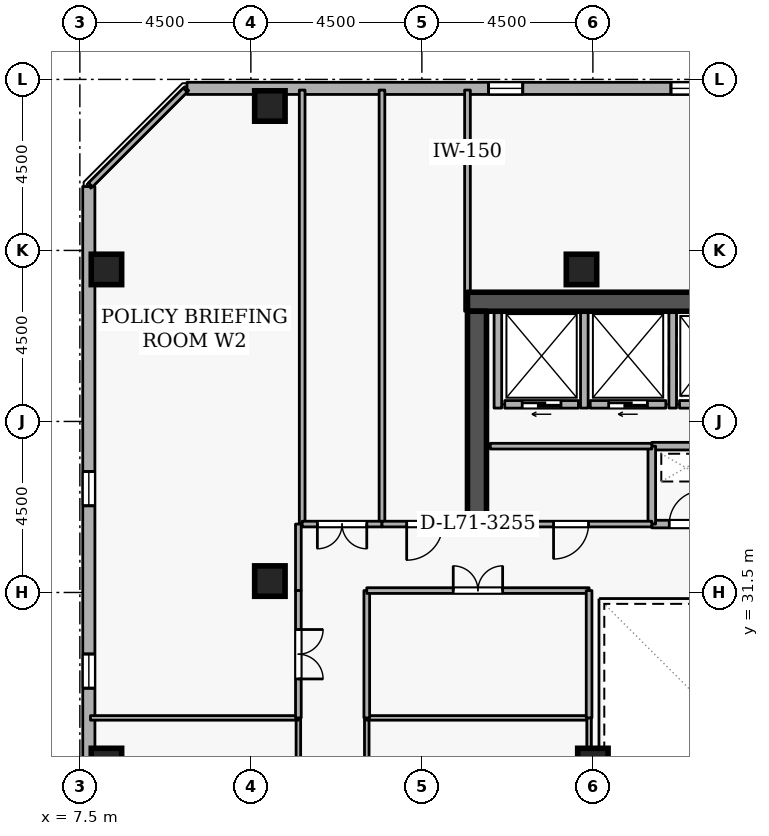
"""IFC4 building model, lengths in metres.
Left out: names, types, materials, properties, quantities, classifications, styles, units other than length and angle.
Written with IfcOpenShell. Run it as: python <this file> out.ifc"""

import sys

from ifc_helpers import new_model, si_unit, direction, frame, frame_2d, origin, origin_2d, place, context, subcontext, project, spatial, rectangle, extrude, element, fill, save


model = new_model("IFC4")
c1 = context("Model", 3, precision=1e-05, world=origin(), true_north=direction((0.0, 1.0)))
c2 = subcontext(c1, "Body", "Model", "MODEL_VIEW")
j1 = project(units=[si_unit("LENGTHUNIT", "METRE"), si_unit("PLANEANGLEUNIT", "RADIAN")], contexts=[c1])
p1 = place(None, origin())
s1 = spatial("IfcSite", under=j1, at=p1, CompositionType="ELEMENT")
p2 = place(p1, origin())
s2 = spatial("IfcBuilding", under=s1, at=p2, CompositionType="ELEMENT")
p3 = place(p2, frame((0.0, 0.0, 265.5)))
s3 = spatial("IfcBuildingStorey", under=s2, at=p3, CompositionType="ELEMENT", Elevation=265.5)
p4 = place(p3, frame((17.7, 39.15, 0.0), z_axis=(0.0, 0.0, 1.0), x_axis=(1.0, 0.0, 0.0)))
e1 = element("IfcWall", 1, at=p4, inside=s3, PredefinedType="SHEAR", context=c2, shape_type="SweptSolid", body=[
    extrude(rectangle(XDim=15.6, YDim=0.5, at=frame_2d((7.8, 0.0))), origin(), (0.0, 0.0, 1.0), 3.6),
])
p5 = place(p3, frame((17.95, 33.1, 0.0), z_axis=(0.0, 0.0, 1.0), x_axis=(0.0, 1.0, 0.0)))
e2 = element("IfcWall", 2, at=p5, inside=s3, PredefinedType="SHEAR", context=c2, shape_type="SweptSolid", body=[
    extrude(rectangle(XDim=5.8, YDim=0.5, at=frame_2d((2.9, 0.0))), origin(), (0.0, 0.0, 1.0), 3.6),
])
for number, where, z_axis, x_axis in (
    (3, (12.5, 44.3, 0.0), (0.0, 0.0, 1.0), (1.0, 0.0, 0.0)),
    (4, (8.2, 27.0, 0.0), (0.0, 0.0, 1.0), (1.0, 0.0, 0.0)),
    (5, (8.2, 40.0, 0.0), (0.0, 0.0, 1.0), (1.0, 0.0, 0.0)),
    (6, (12.5, 31.8, 0.0), (0.0, 0.0, 1.0), (1.0, 0.0, 0.0)),
    (7, (20.7, 40.0, 0.0), (0.0, 0.0, 1.0), (1.0, 0.0, 0.0)),
    (8, (21.0, 27.0, 0.0), (0.0, 0.0, 1.0), (1.0, 0.0, 0.0)),
):
    element("IfcColumn", number, at=place(p3, frame(where, z_axis=z_axis, x_axis=x_axis)), inside=s3, PredefinedType="COLUMN", context=c2, shape_type="SweptSolid", body=[
        extrude(rectangle(XDim=0.8, YDim=0.8, at=origin_2d()), origin(), (0.0, 0.0, 1.0), 3.6),
    ])
p6 = place(p3, frame((45.854, 44.762, 0.0), z_axis=(0.0, 0.0, 1.0), x_axis=(-0.999999997144, 7.5574884e-05, 0.0)))
e9 = element("IfcWall", 9, at=p6, inside=s3, PredefinedType="STANDARD", context=c2, shape_type="SweptSolid", body=[
    extrude(rectangle(XDim=35.535, YDim=0.32, at=frame_2d((17.768, 0.0))), origin(), (0.0, 0.0, 1.0), 2.7),
])
p7 = place(p6, frame((2.7, 0.0, 0.72)))
e10 = element("IfcOpeningElement", 10, at=p7, cuts=e9, PredefinedType="OPENING", context=c2, shape_type="SweptSolid", body=[
    extrude(rectangle(XDim=0.9, YDim=1.75, at=frame_2d((0.45, 0.875))), frame((0.0, 0.17, 0.0), z_axis=(0.0, -1.0, 0.0), x_axis=(1.0, 0.0, 0.0)), (0.0, 0.0, 1.0), 0.34),
])
p8 = place(p6, frame((12.3, 0.0, 0.72)))
e11 = element("IfcOpeningElement", 11, at=p8, cuts=e9, PredefinedType="OPENING", context=c2, shape_type="SweptSolid", body=[
    extrude(rectangle(XDim=0.9, YDim=1.75, at=frame_2d((0.45, 0.875))), frame((0.0, 0.17, 0.0), z_axis=(0.0, -1.0, 0.0), x_axis=(1.0, 0.0, 0.0)), (0.0, 0.0, 1.0), 0.34),
])
p9 = place(p6, frame((17.1, 0.0, 0.72)))
e12 = element("IfcOpeningElement", 12, at=p9, cuts=e9, PredefinedType="OPENING", context=c2, shape_type="SweptSolid", body=[
    extrude(rectangle(XDim=0.9, YDim=1.75, at=frame_2d((0.45, 0.875))), frame((0.0, 0.17, 0.0), z_axis=(0.0, -1.0, 0.0), x_axis=(1.0, 0.0, 0.0)), (0.0, 0.0, 1.0), 0.34),
])
p10 = place(p6, frame((21.9, 0.0, 0.72)))
e13 = element("IfcOpeningElement", 13, at=p10, cuts=e9, PredefinedType="OPENING", context=c2, shape_type="SweptSolid", body=[
    extrude(rectangle(XDim=0.9, YDim=1.75, at=frame_2d((0.45, 0.875))), frame((0.0, 0.17, 0.0), z_axis=(0.0, -1.0, 0.0), x_axis=(1.0, 0.0, 0.0)), (0.0, 0.0, 1.0), 0.34),
])
p11 = place(p6, frame((26.7, 0.0, 0.72)))
e14 = element("IfcOpeningElement", 14, at=p11, cuts=e9, PredefinedType="OPENING", context=c2, shape_type="SweptSolid", body=[
    extrude(rectangle(XDim=0.9, YDim=1.75, at=frame_2d((0.45, 0.875))), frame((0.0, 0.17, 0.0), z_axis=(0.0, -1.0, 0.0), x_axis=(1.0, 0.0, 0.0)), (0.0, 0.0, 1.0), 0.34),
])
p12 = place(p3, frame((7.735, 42.181, 0.0), z_axis=(0.0, 0.0, 1.0), x_axis=(7.5574884e-05, -0.999999997144, 0.0)))
e15 = element("IfcWall", 15, at=p12, inside=s3, PredefinedType="STANDARD", context=c2, shape_type="SweptSolid", body=[
    extrude(rectangle(XDim=35.535, YDim=0.32, at=frame_2d((17.768, 0.0))), origin(), (0.0, 0.0, 1.0), 2.7),
])
p13 = place(p12, frame((7.5, 0.0, 0.72)))
e16 = element("IfcOpeningElement", 16, at=p13, cuts=e15, PredefinedType="OPENING", context=c2, shape_type="SweptSolid", body=[
    extrude(rectangle(XDim=0.9, YDim=1.75, at=frame_2d((0.45, 0.875))), frame((0.0, 0.17, 0.0), z_axis=(0.0, -1.0, 0.0), x_axis=(1.0, 0.0, 0.0)), (0.0, 0.0, 1.0), 0.34),
])
p14 = place(p12, frame((12.3, 0.0, 0.72)))
e17 = element("IfcOpeningElement", 17, at=p14, cuts=e15, PredefinedType="OPENING", context=c2, shape_type="SweptSolid", body=[
    extrude(rectangle(XDim=0.9, YDim=1.75, at=frame_2d((0.45, 0.875))), frame((0.0, 0.17, 0.0), z_axis=(0.0, -1.0, 0.0), x_axis=(1.0, 0.0, 0.0)), (0.0, 0.0, 1.0), 0.34),
])
p15 = place(p12, frame((17.1, 0.0, 0.72)))
e18 = element("IfcOpeningElement", 18, at=p15, cuts=e15, PredefinedType="OPENING", context=c2, shape_type="SweptSolid", body=[
    extrude(rectangle(XDim=0.9, YDim=1.75, at=frame_2d((0.45, 0.875))), frame((0.0, 0.17, 0.0), z_axis=(0.0, -1.0, 0.0), x_axis=(1.0, 0.0, 0.0)), (0.0, 0.0, 1.0), 0.34),
])
p16 = place(p12, frame((21.9, 0.0, 0.72)))
e19 = element("IfcOpeningElement", 19, at=p16, cuts=e15, PredefinedType="OPENING", context=c2, shape_type="SweptSolid", body=[
    extrude(rectangle(XDim=0.9, YDim=1.75, at=frame_2d((0.45, 0.875))), frame((0.0, 0.17, 0.0), z_axis=(0.0, -1.0, 0.0), x_axis=(1.0, 0.0, 0.0)), (0.0, 0.0, 1.0), 0.34),
])
p17 = place(p12, frame((31.5, 0.0, 0.72)))
e20 = element("IfcOpeningElement", 20, at=p17, cuts=e15, PredefinedType="OPENING", context=c2, shape_type="SweptSolid", body=[
    extrude(rectangle(XDim=0.9, YDim=1.75, at=frame_2d((0.45, 0.875))), frame((0.0, 0.17, 0.0), z_axis=(0.0, -1.0, 0.0), x_axis=(1.0, 0.0, 0.0)), (0.0, 0.0, 1.0), 0.34),
])
p18 = place(p3, frame((24.92, 36.45, 0.0), z_axis=(0.0, 0.0, 1.0), x_axis=(-1.0, 0.0, 0.0)))
e21 = element("IfcWall", 21, at=p18, inside=s3, PredefinedType="STANDARD", context=c2, shape_type="SweptSolid", body=[
    extrude(rectangle(XDim=1.64, YDim=0.2, at=frame_2d((0.82, 0.0))), origin(), (0.0, 0.0, 1.0), 3.34),
])
p19 = place(p18, frame((0.31, 0.0, 0.0)))
e22 = element("IfcOpeningElement", 22, at=p19, cuts=e21, PredefinedType="OPENING", context=c2, shape_type="SweptSolid", body=[
    extrude(rectangle(XDim=1.02, YDim=2.06, at=frame_2d((0.51, 1.03))), frame((0.0, 0.11, 0.0), z_axis=(0.0, -1.0, 0.0), x_axis=(1.0, 0.0, 0.0)), (0.0, 0.0, 1.0), 0.22),
])
p20 = place(p3, frame((22.92, 36.45, 0.0), z_axis=(0.0, 0.0, 1.0), x_axis=(-1.0, 0.0, 0.0)))
e23 = element("IfcWall", 23, at=p20, inside=s3, PredefinedType="STANDARD", context=c2, shape_type="SweptSolid", body=[
    extrude(rectangle(XDim=1.99, YDim=0.2, at=frame_2d((0.995, 0.0))), origin(), (0.0, 0.0, 1.0), 3.34),
])
p21 = place(p20, frame((0.485, 0.0, 0.0)))
e24 = element("IfcOpeningElement", 24, at=p21, cuts=e23, PredefinedType="OPENING", context=c2, shape_type="SweptSolid", body=[
    extrude(rectangle(XDim=1.02, YDim=2.06, at=frame_2d((0.51, 1.03))), frame((0.0, 0.11, 0.0), z_axis=(0.0, -1.0, 0.0), x_axis=(1.0, 0.0, 0.0)), (0.0, 0.0, 1.0), 0.22),
])
p22 = place(p3, frame((20.62, 36.45, 0.0), z_axis=(0.0, 0.0, 1.0), x_axis=(-1.0, 0.0, 0.0)))
e25 = element("IfcWall", 25, at=p22, inside=s3, PredefinedType="STANDARD", context=c2, shape_type="SweptSolid", body=[
    extrude(rectangle(XDim=1.94, YDim=0.2, at=frame_2d((0.97, 0.0))), origin(), (0.0, 0.0, 1.0), 3.34),
])
p23 = place(p22, frame((0.46, 0.0, 0.0)))
e26 = element("IfcOpeningElement", 26, at=p23, cuts=e25, PredefinedType="OPENING", context=c2, shape_type="SweptSolid", body=[
    extrude(rectangle(XDim=1.02, YDim=2.06, at=frame_2d((0.51, 1.03))), frame((0.0, 0.11, 0.0), z_axis=(0.0, -1.0, 0.0), x_axis=(1.0, 0.0, 0.0)), (0.0, 0.0, 1.0), 0.22),
])
for number, where, z_axis, x_axis in (
    (27, (23.1, 36.352, 0.0), (0.0, 0.0, 1.0), (0.0, 1.0, 0.0)),
    (28, (20.775, 36.352, 0.0), (0.0, 0.0, 1.0), (0.0, 1.0, 0.0)),
    (29, (18.5, 36.352, 0.0), (0.0, 0.0, 1.0), (0.0, 1.0, 0.0)),
):
    element("IfcWall", number, at=place(p3, frame(where, z_axis=z_axis, x_axis=x_axis)), inside=s3, PredefinedType="STANDARD", context=c2, shape_type="SweptSolid", body=[
        extrude(rectangle(XDim=2.536, YDim=0.2, at=frame_2d((1.268, 0.0))), origin(), (0.0, 0.0, 1.0), 3.34),
    ])
p24 = place(p3, frame((22.55, 33.3, 0.0), z_axis=(0.0, 0.0, 1.0), x_axis=(1.0, 0.0, 0.0)))
e30 = element("IfcWall", 30, at=p24, inside=s3, PredefinedType="STANDARD", context=c2, shape_type="SweptSolid", body=[
    extrude(rectangle(XDim=1.8, YDim=0.2, at=frame_2d((0.9, 0.0))), origin(), (0.0, 0.0, 1.0), 3.34),
])
p25 = place(p24, frame((0.46, 0.0, 0.0)))
e31 = element("IfcOpeningElement", 31, at=p25, cuts=e30, PredefinedType="OPENING", context=c2, shape_type="SweptSolid", body=[
    extrude(rectangle(XDim=0.88, YDim=2.04, at=frame_2d((0.44, 1.02))), frame((0.0, 0.11, 0.0), z_axis=(0.0, -1.0, 0.0), x_axis=(1.0, 0.0, 0.0)), (0.0, 0.0, 1.0), 0.22),
])
p26 = place(p3, frame((24.35, 35.35, 0.0), z_axis=(0.0, 0.0, 1.0), x_axis=(-1.0, 0.0, 0.0)))
e32 = element("IfcWall", 32, at=p26, inside=s3, PredefinedType="STANDARD", context=c2, shape_type="SweptSolid", body=[
    extrude(rectangle(XDim=1.8, YDim=0.2, at=frame_2d((0.9, 0.0))), origin(), (0.0, 0.0, 1.0), 3.34),
])
p27 = place(p3, frame((22.55, 35.35, 0.0), z_axis=(0.0, 0.0, 1.0), x_axis=(0.0, -1.0, 0.0)))
e33 = element("IfcWall", 33, at=p27, inside=s3, PredefinedType="STANDARD", context=c2, shape_type="SweptSolid", body=[
    extrude(rectangle(XDim=2.05, YDim=0.2, at=frame_2d((1.025, 0.0))), origin(), (0.0, 0.0, 1.0), 3.34),
])
p28 = place(p3, frame((18.3, 35.35, 0.0), z_axis=(0.0, 0.0, 1.0), x_axis=(1.0, 0.0, 0.0)))
e34 = element("IfcWall", 34, at=p28, inside=s3, PredefinedType="PARTITIONING", context=c2, shape_type="SweptSolid", body=[
    extrude(rectangle(XDim=4.25, YDim=0.15, at=frame_2d((2.125, 0.0))), origin(), (0.0, 0.0, 1.0), 3.34),
])
p29 = place(p3, frame((22.55, 33.3, 0.0), z_axis=(0.0, 0.0, 1.0), x_axis=(-1.0, 0.0, 0.0)))
e35 = element("IfcWall", 35, at=p29, inside=s3, PredefinedType="PARTITIONING", context=c2, shape_type="SweptSolid", body=[
    extrude(rectangle(XDim=4.25, YDim=0.15, at=frame_2d((2.125, 0.0))), origin(), (0.0, 0.0, 1.0), 3.34),
])
p30 = place(p29, frame((1.665, 0.0, 0.0)))
e36 = element("IfcOpeningElement", 36, at=p30, cuts=e35, PredefinedType="OPENING", context=c2, shape_type="SweptSolid", body=[
    extrude(rectangle(XDim=0.92, YDim=2.08, at=frame_2d((0.46, 1.04))), frame((0.0, 0.085, 0.0), z_axis=(0.0, -1.0, 0.0), x_axis=(1.0, 0.0, 0.0)), (0.0, 0.0, 1.0), 0.17),
])
for number, where, z_axis, x_axis in (
    (37, (13.35, 33.3, 0.0), (0.0, 0.0, 1.0), (0.0, 1.0, 0.0)),
    (38, (15.45, 44.72, 0.0), (0.0, 0.0, 1.0), (0.0, -1.0, 0.0)),
):
    element("IfcWall", number, at=place(p3, frame(where, z_axis=z_axis, x_axis=x_axis)), inside=s3, PredefinedType="PARTITIONING", context=c2, shape_type="SweptSolid", body=[
        extrude(rectangle(XDim=11.42, YDim=0.15, at=frame_2d((5.71, 0.0))), origin(), (0.0, 0.0, 1.0), 3.34),
    ])
p31 = place(p3, frame((15.45, 33.3, 0.0), z_axis=(0.0, 0.0, 1.0), x_axis=(-1.0, 0.0, 0.0)))
e39 = element("IfcWall", 39, at=p31, inside=s3, PredefinedType="PARTITIONING", context=c2, shape_type="SweptSolid", body=[
    extrude(rectangle(XDim=2.1, YDim=0.15, at=frame_2d((1.05, 0.0))), origin(), (0.0, 0.0, 1.0), 3.34),
])
p32 = place(p31, frame((0.4, 0.0, 0.0)))
e40 = element("IfcOpeningElement", 40, at=p32, cuts=e39, PredefinedType="OPENING", context=c2, shape_type="SweptSolid", body=[
    extrude(rectangle(XDim=1.3, YDim=2.12, at=frame_2d((0.65, 1.06))), frame((0.0, 0.085, 0.0), z_axis=(0.0, -1.0, 0.0), x_axis=(1.0, 0.0, 0.0)), (0.0, 0.0, 1.0), 0.17),
])
p33 = place(p3, frame((17.7, 44.72, 0.0), z_axis=(0.0, 0.0, 1.0), x_axis=(0.0, -1.0, 0.0)))
e41 = element("IfcWall", 41, at=p33, inside=s3, PredefinedType="PARTITIONING", context=c2, shape_type="SweptSolid", body=[
    extrude(rectangle(XDim=5.82, YDim=0.15, at=frame_2d((2.91, 0.0))), origin(), (0.0, 0.0, 1.0), 2.545),
])
p34 = place(p3, frame((17.7, 33.3, 0.0), z_axis=(0.0, 0.0, 1.0), x_axis=(-1.0, 0.0, 0.0)))
e42 = element("IfcWall", 42, at=p34, inside=s3, PredefinedType="PARTITIONING", context=c2, shape_type="SweptSolid", body=[
    extrude(rectangle(XDim=2.25, YDim=0.15, at=frame_2d((1.125, 0.0))), origin(), (0.0, 0.0, 1.0), 3.34),
])
p35 = place(p34, frame((0.65, 0.0, 0.0)))
e43 = element("IfcOpeningElement", 43, at=p35, cuts=e42, PredefinedType="OPENING", context=c2, shape_type="SweptSolid", body=[
    extrude(rectangle(XDim=0.95, YDim=2.1, at=frame_2d((0.475, 1.05))), frame((0.0, 0.085, 0.0), z_axis=(0.0, -1.0, 0.0), x_axis=(1.0, 0.0, 0.0)), (0.0, 0.0, 1.0), 0.17),
])
p36 = place(p3, frame((13.25, 28.2, 0.0), z_axis=(0.0, 0.0, 1.0), x_axis=(0.0, -1.0, 0.0)))
e44 = element("IfcWall", 44, at=p36, inside=s3, PredefinedType="PARTITIONING", context=c2, shape_type="SweptSolid", body=[
    extrude(rectangle(XDim=5.75, YDim=0.12, at=frame_2d((2.875, 0.0))), origin(), (0.0, 0.0, 1.0), 3.34),
])
p37 = place(p36, frame((2.35, 0.0, 0.0)))
e45 = element("IfcOpeningElement", 45, at=p37, cuts=e44, PredefinedType="OPENING", context=c2, shape_type="SweptSolid", body=[
    extrude(rectangle(XDim=1.05, YDim=2.1, at=frame_2d((0.525, 1.05))), frame((0.0, 0.07, 0.0), z_axis=(0.0, -1.0, 0.0), x_axis=(1.0, 0.0, 0.0)), (0.0, 0.0, 1.0), 0.14),
])
p38 = place(p3, frame((7.78, 28.2, 0.0), z_axis=(0.0, 0.0, 1.0), x_axis=(1.0, 0.0, 0.0)))
e46 = element("IfcWall", 46, at=p38, inside=s3, PredefinedType="PARTITIONING", context=c2, shape_type="SweptSolid", body=[
    extrude(rectangle(XDim=5.47, YDim=0.12, at=frame_2d((2.735, 0.0))), origin(), (0.0, 0.0, 1.0), 3.34),
])
p39 = place(p3, frame((7.78, 42.225, 0.0), z_axis=(0.0, 0.0, 1.0), x_axis=(0.707106781187, 0.707106781187, 0.0)))
e47 = element("IfcWall", 47, at=p39, inside=s3, PredefinedType="PARTITIONING", context=c2, shape_type="SweptSolid", body=[
    extrude(rectangle(XDim=3.528, YDim=0.15, at=frame_2d((1.764, 0.0))), origin(), (0.0, 0.0, 1.0), 3.34),
])
p40 = place(p3, frame((13.25, 33.3, 0.0), z_axis=(0.0, 0.0, 1.0), x_axis=(0.0, -1.0, 0.0)))
e48 = element("IfcWall", 48, at=p40, inside=s3, PredefinedType="PARTITIONING", context=c2, shape_type="SweptSolid", body=[
    extrude(rectangle(XDim=1.75, YDim=0.15, at=frame_2d((0.875, 0.0))), origin(), (0.0, 0.0, 1.0), 3.34),
])
p41 = place(p3, frame((13.25, 31.55, 0.0), z_axis=(0.0, 0.0, 1.0), x_axis=(0.0, -1.0, 0.0)))
e49 = element("IfcWall", 49, at=p41, inside=s3, PredefinedType="PARTITIONING", context=c2, shape_type="SweptSolid", body=[
    extrude(rectangle(XDim=3.35, YDim=0.15, at=frame_2d((1.675, 0.0))), origin(), (0.0, 0.0, 1.0), 3.34),
])
p42 = place(p41, frame((1.025, 0.0, 0.0)))
e50 = element("IfcOpeningElement", 50, at=p42, cuts=e49, PredefinedType="OPENING", context=c2, shape_type="SweptSolid", body=[
    extrude(rectangle(XDim=1.3, YDim=2.12, at=frame_2d((0.65, 1.06))), frame((0.0, 0.085, 0.0), z_axis=(0.0, -1.0, 0.0), x_axis=(1.0, 0.0, 0.0)), (0.0, 0.0, 1.0), 0.17),
])
p43 = place(p3, frame((15.05, 22.45, 0.0), z_axis=(0.0, 0.0, 1.0), x_axis=(0.0, 1.0, 0.0)))
e51 = element("IfcWall", 51, at=p43, inside=s3, PredefinedType="PARTITIONING", context=c2, shape_type="SweptSolid", body=[
    extrude(rectangle(XDim=5.75, YDim=0.12, at=frame_2d((2.875, 0.0))), origin(), (0.0, 0.0, 1.0), 3.34),
])
p44 = place(p3, frame((15.05, 28.2, 0.0), z_axis=(0.0, 0.0, 1.0), x_axis=(1.0, 0.0, 0.0)))
e52 = element("IfcWall", 52, at=p44, inside=s3, PredefinedType="PARTITIONING", context=c2, shape_type="SweptSolid", body=[
    extrude(rectangle(XDim=5.85, YDim=0.12, at=frame_2d((2.925, 0.0))), origin(), (0.0, 0.0, 1.0), 3.34),
])
p45 = place(p3, frame((20.9, 28.2, 0.0), z_axis=(0.0, 0.0, 1.0), x_axis=(0.0, -1.0, 0.0)))
e53 = element("IfcWall", 53, at=p45, inside=s3, PredefinedType="PARTITIONING", context=c2, shape_type="SweptSolid", body=[
    extrude(rectangle(XDim=5.75, YDim=0.12, at=frame_2d((2.875, 0.0))), origin(), (0.0, 0.0, 1.0), 3.34),
])
p46 = place(p3, frame((15.05, 28.2, 0.0), z_axis=(0.0, 0.0, 1.0), x_axis=(0.0, 1.0, 0.0)))
e54 = element("IfcWall", 54, at=p46, inside=s3, PredefinedType="PARTITIONING", context=c2, shape_type="SweptSolid", body=[
    extrude(rectangle(XDim=3.35, YDim=0.15, at=frame_2d((1.675, 0.0))), origin(), (0.0, 0.0, 1.0), 3.34),
])
p47 = place(p3, frame((15.05, 31.55, 0.0), z_axis=(0.0, 0.0, 1.0), x_axis=(1.0, 0.0, 0.0)))
e55 = element("IfcWall", 55, at=p47, inside=s3, PredefinedType="PARTITIONING", context=c2, shape_type="SweptSolid", body=[
    extrude(rectangle(XDim=5.85, YDim=0.15, at=frame_2d((2.925, 0.0))), origin(), (0.0, 0.0, 1.0), 3.34),
])
p48 = place(p47, frame((2.275, 0.0, 0.0)))
e56 = element("IfcOpeningElement", 56, at=p48, cuts=e55, PredefinedType="OPENING", context=c2, shape_type="SweptSolid", body=[
    extrude(rectangle(XDim=1.3, YDim=2.12, at=frame_2d((0.65, 1.06))), frame((0.0, 0.085, 0.0), z_axis=(0.0, -1.0, 0.0), x_axis=(1.0, 0.0, 0.0)), (0.0, 0.0, 1.0), 0.17),
])
p49 = place(p3, frame((20.9, 31.55, 0.0), z_axis=(0.0, 0.0, 1.0), x_axis=(0.0, -1.0, 0.0)))
e57 = element("IfcWall", 57, at=p49, inside=s3, PredefinedType="PARTITIONING", context=c2, shape_type="SweptSolid", body=[
    extrude(rectangle(XDim=3.35, YDim=0.15, at=frame_2d((1.675, 0.0))), origin(), (0.0, 0.0, 1.0), 3.34),
])
p50 = place(p10, origin())
e58 = element("IfcWindow", 58, at=p50, inside=s3, PartitioningType="SINGLE_PANEL", PredefinedType="WINDOW", context=c2, shape_type="SweptSolid", body=[
    extrude(rectangle(XDim=0.9, YDim=1.75, at=frame_2d((0.45, 0.875))), frame((0.0, 0.03, 0.0), z_axis=(0.0, -1.0, 0.0), x_axis=(1.0, 0.0, 0.0)), (0.0, 0.0, 1.0), 0.06),
])
fill(e13, e58)
p51 = place(p11, origin())
e59 = element("IfcWindow", 59, at=p51, inside=s3, PartitioningType="SINGLE_PANEL", PredefinedType="WINDOW", context=c2, shape_type="SweptSolid", body=[
    extrude(rectangle(XDim=0.9, YDim=1.75, at=frame_2d((0.45, 0.875))), frame((0.0, 0.03, 0.0), z_axis=(0.0, -1.0, 0.0), x_axis=(1.0, 0.0, 0.0)), (0.0, 0.0, 1.0), 0.06),
])
fill(e14, e59)
p52 = place(p13, origin())
e60 = element("IfcWindow", 60, at=p52, inside=s3, PartitioningType="SINGLE_PANEL", PredefinedType="WINDOW", context=c2, shape_type="SweptSolid", body=[
    extrude(rectangle(XDim=0.9, YDim=1.75, at=frame_2d((0.45, 0.875))), frame((0.0, 0.03, 0.0), z_axis=(0.0, -1.0, 0.0), x_axis=(1.0, 0.0, 0.0)), (0.0, 0.0, 1.0), 0.06),
])
fill(e16, e60)
p53 = place(p14, origin())
e61 = element("IfcWindow", 61, at=p53, inside=s3, PartitioningType="SINGLE_PANEL", PredefinedType="WINDOW", context=c2, shape_type="SweptSolid", body=[
    extrude(rectangle(XDim=0.9, YDim=1.75, at=frame_2d((0.45, 0.875))), frame((0.0, 0.03, 0.0), z_axis=(0.0, -1.0, 0.0), x_axis=(1.0, 0.0, 0.0)), (0.0, 0.0, 1.0), 0.06),
])
fill(e17, e61)
p54 = place(p21, origin())
e62 = element("IfcDoor", 62, at=p54, inside=s3, OperationType="SLIDING_TO_LEFT", PredefinedType="DOOR", context=c2, shape_type="SweptSolid", body=[
    extrude(rectangle(XDim=1.02, YDim=2.06, at=frame_2d((0.51, 1.03))), frame((0.0, 0.025, 0.0), z_axis=(0.0, -1.0, 0.0), x_axis=(1.0, 0.0, 0.0)), (0.0, 0.0, 1.0), 0.05),
])
fill(e24, e62)
p55 = place(p23, origin())
e63 = element("IfcDoor", 63, at=p55, inside=s3, OperationType="SLIDING_TO_LEFT", PredefinedType="DOOR", context=c2, shape_type="SweptSolid", body=[
    extrude(rectangle(XDim=1.02, YDim=2.06, at=frame_2d((0.51, 1.03))), frame((0.0, 0.025, 0.0), z_axis=(0.0, -1.0, 0.0), x_axis=(1.0, 0.0, 0.0)), (0.0, 0.0, 1.0), 0.05),
])
fill(e26, e63)
p56 = place(p25, origin())
e64 = element("IfcDoor", 64, at=p56, inside=s3, OperationType="SINGLE_SWING_RIGHT", PredefinedType="DOOR", context=c2, shape_type="SweptSolid", body=[
    extrude(rectangle(XDim=0.88, YDim=2.04, at=frame_2d((0.44, 1.02))), frame((0.0, 0.025, 0.0), z_axis=(0.0, -1.0, 0.0), x_axis=(1.0, 0.0, 0.0)), (0.0, 0.0, 1.0), 0.05),
])
fill(e31, e64)
p57 = place(p30, origin())
e65 = element("IfcDoor", 65, at=p57, inside=s3, OperationType="SINGLE_SWING_RIGHT", PredefinedType="DOOR", context=c2, shape_type="SweptSolid", body=[
    extrude(rectangle(XDim=0.92, YDim=2.08, at=frame_2d((0.46, 1.04))), frame((0.0, 0.025, 0.0), z_axis=(0.0, -1.0, 0.0), x_axis=(1.0, 0.0, 0.0)), (0.0, 0.0, 1.0), 0.05),
])
fill(e36, e65)
p58 = place(p32, origin())
e66 = element("IfcDoor", 66, at=p58, inside=s3, OperationType="DOUBLE_DOOR_SINGLE_SWING", PredefinedType="DOOR", context=c2, shape_type="SweptSolid", body=[
    extrude(rectangle(XDim=1.3, YDim=2.12, at=frame_2d((0.65, 1.06))), frame((0.0, 0.025, 0.0), z_axis=(0.0, -1.0, 0.0), x_axis=(1.0, 0.0, 0.0)), (0.0, 0.0, 1.0), 0.05),
])
fill(e40, e66)
p59 = place(p35, origin())
e67 = element("IfcDoor", 67, at=p59, inside=s3, OperationType="SINGLE_SWING_RIGHT", PredefinedType="DOOR", context=c2, shape_type="SweptSolid", body=[
    extrude(rectangle(XDim=0.95, YDim=2.1, at=frame_2d((0.475, 1.05))), frame((0.0, 0.025, 0.0), z_axis=(0.0, -1.0, 0.0), x_axis=(1.0, 0.0, 0.0)), (0.0, 0.0, 1.0), 0.05),
])
fill(e43, e67)
p60 = place(p42, origin())
e68 = element("IfcDoor", 68, at=p60, inside=s3, OperationType="DOUBLE_DOOR_SINGLE_SWING", PredefinedType="DOOR", context=c2, shape_type="SweptSolid", body=[
    extrude(rectangle(XDim=1.3, YDim=2.12, at=frame_2d((0.65, 1.06))), frame((0.0, 0.025, 0.0), z_axis=(0.0, -1.0, 0.0), x_axis=(1.0, 0.0, 0.0)), (0.0, 0.0, 1.0), 0.05),
])
fill(e50, e68)
p61 = place(p48, origin())
e69 = element("IfcDoor", 69, at=p61, inside=s3, OperationType="DOUBLE_DOOR_SINGLE_SWING", PredefinedType="DOOR", context=c2, shape_type="SweptSolid", body=[
    extrude(rectangle(XDim=1.3, YDim=2.12, at=frame_2d((0.65, 1.06))), frame((0.0, 0.025, 0.0), z_axis=(0.0, -1.0, 0.0), x_axis=(1.0, 0.0, 0.0)), (0.0, 0.0, 1.0), 0.05),
])
fill(e56, e69)
save(model, sys.argv[1])
